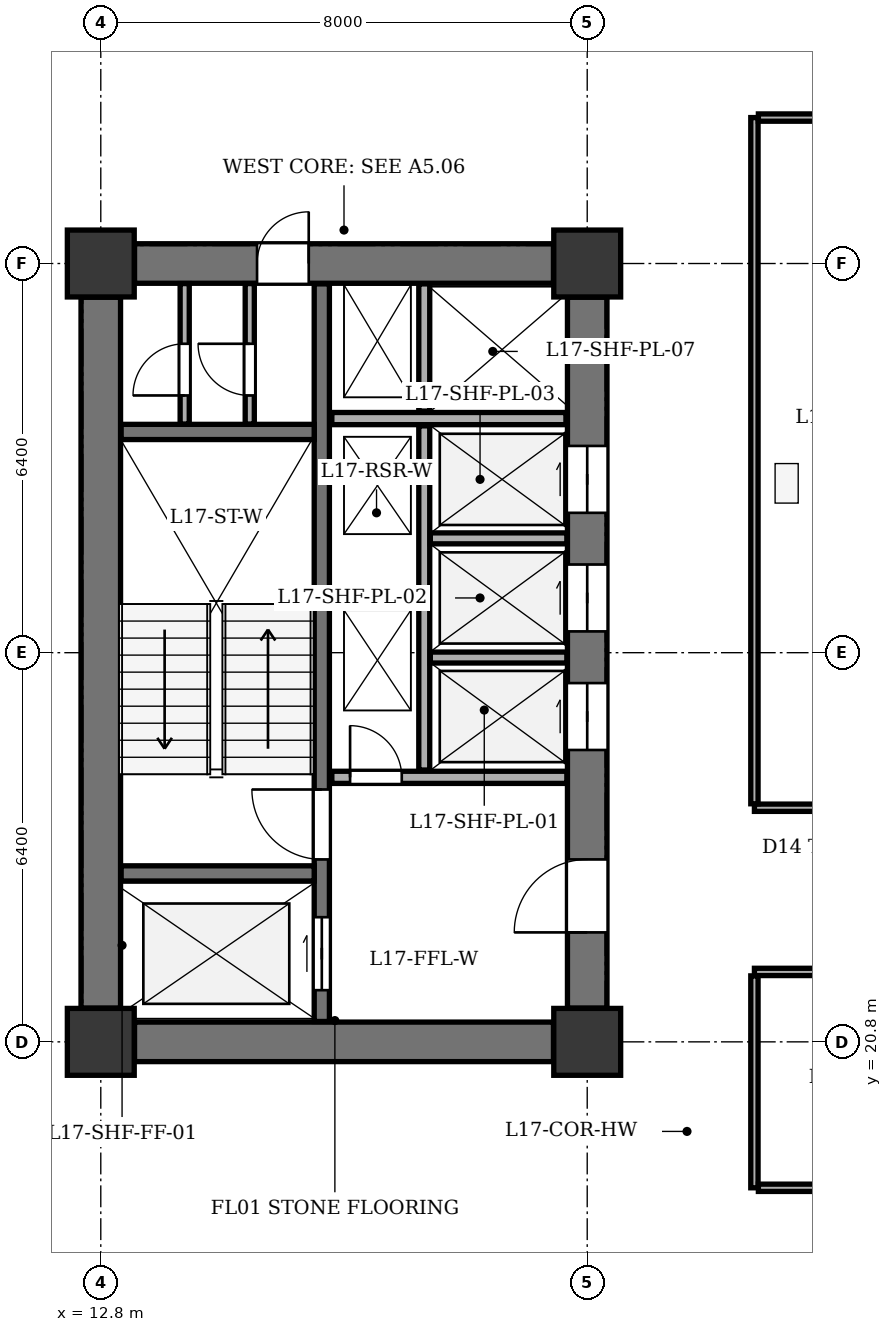
"""IFC4 building model, lengths in metres.
Left out: names, types, materials, properties, quantities, classifications, styles, units other than length and angle.
Written with IfcOpenShell. Run it as: python <this file> out.ifc"""

import sys

from ifc_helpers import new_model, si_unit, direction, frame, frame_2d, origin, origin_2d, place, context, subcontext, project, spatial, rectangle, extrude, element, fill, save


model = new_model("IFC4")
c1 = context("Model", 3, precision=1e-05, world=origin(), true_north=direction((0.0, 1.0)))
c2 = subcontext(c1, "Body", "Model", "MODEL_VIEW")
j1 = project(units=[si_unit("LENGTHUNIT", "METRE"), si_unit("PLANEANGLEUNIT", "RADIAN")], contexts=[c1])
p1 = place(None, origin())
s1 = spatial("IfcSite", under=j1, at=p1, CompositionType="ELEMENT")
p2 = place(p1, origin())
s2 = spatial("IfcBuilding", under=s1, at=p2, CompositionType="ELEMENT")
p3 = place(p2, frame((0.0, 0.0, 71.1)))
s3 = spatial("IfcBuildingStorey", under=s2, at=p3, CompositionType="ELEMENT", Elevation=71.1)
for number, where, z_axis, x_axis in (
    (1, (12.8, 20.8, 0.0), (0.0, 0.0, 1.0), (1.0, 0.0, 0.0)),
    (2, (20.8, 20.8, 0.0), (0.0, 0.0, 1.0), (1.0, 0.0, 0.0)),
    (3, (12.8, 33.6, 0.0), (0.0, 0.0, 1.0), (1.0, 0.0, 0.0)),
    (4, (20.8, 33.6, 0.0), (0.0, 0.0, 1.0), (1.0, 0.0, 0.0)),
):
    element("IfcColumn", number, at=place(p3, frame(where, z_axis=z_axis, x_axis=x_axis)), inside=s3, PredefinedType="COLUMN", context=c2, shape_type="SweptSolid", body=[
        extrude(rectangle(XDim=1.1, YDim=1.1, at=origin_2d()), origin(), (0.0, 0.0, 1.0), 3.9),
    ])
p4 = place(p3, frame((12.8, 21.355, 0.0), z_axis=(0.0, 0.0, 1.0), x_axis=(0.0, 1.0, 0.0)))
e5 = element("IfcWall", 5, at=p4, inside=s3, PredefinedType="SHEAR", context=c2, shape_type="SweptSolid", body=[
    extrude(rectangle(XDim=11.69, YDim=0.65, at=frame_2d((5.845, 0.0))), origin(), (0.0, 0.0, 1.0), 3.6),
])
p5 = place(p3, frame((13.355, 20.8, 0.0), z_axis=(0.0, 0.0, 1.0), x_axis=(1.0, 0.0, 0.0)))
e6 = element("IfcWall", 6, at=p5, inside=s3, PredefinedType="SHEAR", context=c2, shape_type="SweptSolid", body=[
    extrude(rectangle(XDim=6.89, YDim=0.65, at=frame_2d((3.445, 0.0))), origin(), (0.0, 0.0, 1.0), 3.6),
])
p6 = place(p3, frame((13.355, 33.6, 0.0), z_axis=(0.0, 0.0, 1.0), x_axis=(1.0, 0.0, 0.0)))
e7 = element("IfcWall", 7, at=p6, inside=s3, PredefinedType="SHEAR", context=c2, shape_type="SweptSolid", body=[
    extrude(rectangle(XDim=6.89, YDim=0.65, at=frame_2d((3.445, 0.0))), origin(), (0.0, 0.0, 1.0), 3.6),
])
p7 = place(p6, frame((2.015, 0.0, 0.0)))
e8 = element("IfcOpeningElement", 8, at=p7, cuts=e7, PredefinedType="OPENING", context=c2, shape_type="SweptSolid", body=[
    extrude(rectangle(XDim=0.85, YDim=2.02, at=frame_2d((0.425, 1.01))), frame((0.0, 0.335, 0.0), z_axis=(0.0, -1.0, 0.0), x_axis=(1.0, 0.0, 0.0)), (0.0, 0.0, 1.0), 0.67),
])
p8 = place(p3, frame((20.8, 21.355, 0.0), z_axis=(0.0, 0.0, 1.0), x_axis=(0.0, 1.0, 0.0)))
e9 = element("IfcWall", 9, at=p8, inside=s3, PredefinedType="SHEAR", context=c2, shape_type="SweptSolid", body=[
    extrude(rectangle(XDim=11.69, YDim=0.65, at=frame_2d((5.845, 0.0))), origin(), (0.0, 0.0, 1.0), 3.6),
])
p9 = place(p8, frame((1.245, 0.0, 0.0)))
e10 = element("IfcOpeningElement", 10, at=p9, cuts=e9, PredefinedType="OPENING", context=c2, shape_type="SweptSolid", body=[
    extrude(rectangle(XDim=1.2, YDim=2.15, at=frame_2d((0.6, 1.075))), frame((0.0, 0.335, 0.0), z_axis=(0.0, -1.0, 0.0), x_axis=(1.0, 0.0, 0.0)), (0.0, 0.0, 1.0), 0.67),
])
p10 = place(p8, frame((4.245, 0.0, 0.0)))
e11 = element("IfcOpeningElement", 11, at=p10, cuts=e9, PredefinedType="OPENING", context=c2, shape_type="SweptSolid", body=[
    extrude(rectangle(XDim=1.1, YDim=2.1, at=frame_2d((0.55, 1.05))), frame((0.0, 0.335, 0.0), z_axis=(0.0, -1.0, 0.0), x_axis=(1.0, 0.0, 0.0)), (0.0, 0.0, 1.0), 0.67),
])
p11 = place(p8, frame((6.195, 0.0, 0.0)))
e12 = element("IfcOpeningElement", 12, at=p11, cuts=e9, PredefinedType="OPENING", context=c2, shape_type="SweptSolid", body=[
    extrude(rectangle(XDim=1.1, YDim=2.1, at=frame_2d((0.55, 1.05))), frame((0.0, 0.335, 0.0), z_axis=(0.0, -1.0, 0.0), x_axis=(1.0, 0.0, 0.0)), (0.0, 0.0, 1.0), 0.67),
])
p12 = place(p8, frame((8.145, 0.0, 0.0)))
e13 = element("IfcOpeningElement", 13, at=p12, cuts=e9, PredefinedType="OPENING", context=c2, shape_type="SweptSolid", body=[
    extrude(rectangle(XDim=1.1, YDim=2.1, at=frame_2d((0.55, 1.05))), frame((0.0, 0.335, 0.0), z_axis=(0.0, -1.0, 0.0), x_axis=(1.0, 0.0, 0.0)), (0.0, 0.0, 1.0), 0.67),
])
p13 = place(p3, frame((16.435, 21.135, 0.0), z_axis=(0.0, 0.0, 1.0), x_axis=(0.0, 1.0, 0.0)))
e14 = element("IfcWall", 14, at=p13, inside=s3, PredefinedType="SHEAR", context=c2, shape_type="SweptSolid", body=[
    extrude(rectangle(XDim=12.13, YDim=0.25, at=frame_2d((6.065, 0.0))), origin(), (0.0, 0.0, 1.0), 3.6),
])
p14 = place(p13, frame((0.515, 0.0, 0.0)))
e15 = element("IfcOpeningElement", 15, at=p14, cuts=e14, PredefinedType="OPENING", context=c2, shape_type="SweptSolid", body=[
    extrude(rectangle(XDim=1.2, YDim=2.15, at=frame_2d((0.6, 1.075))), frame((0.0, 0.135, 0.0), z_axis=(0.0, -1.0, 0.0), x_axis=(1.0, 0.0, 0.0)), (0.0, 0.0, 1.0), 0.27),
])
p15 = place(p13, frame((2.665, 0.0, 0.0)))
e16 = element("IfcOpeningElement", 16, at=p15, cuts=e14, PredefinedType="OPENING", context=c2, shape_type="SweptSolid", body=[
    extrude(rectangle(XDim=1.15, YDim=2.15, at=frame_2d((0.575, 1.075))), frame((0.0, 0.135, 0.0), z_axis=(0.0, -1.0, 0.0), x_axis=(1.0, 0.0, 0.0)), (0.0, 0.0, 1.0), 0.27),
])
for number, where, z_axis, x_axis in (
    (17, (13.135, 23.57, 0.0), (0.0, 0.0, 1.0), (1.0, 0.0, 0.0)),
    (18, (13.135, 30.83, 0.0), (0.0, 0.0, 1.0), (1.0, 0.0, 0.0)),
):
    element("IfcWall", number, at=place(p3, frame(where, z_axis=z_axis, x_axis=x_axis)), inside=s3, PredefinedType="SHEAR", context=c2, shape_type="SweptSolid", body=[
        extrude(rectangle(XDim=3.175, YDim=0.25, at=frame_2d((1.587, 0.0))), origin(), (0.0, 0.0, 1.0), 3.6),
    ])
p16 = place(p3, frame((16.6, 25.15, 0.0), z_axis=(0.0, 0.0, 1.0), x_axis=(1.0, 0.0, 0.0)))
e19 = element("IfcWall", 19, at=p16, inside=s3, PredefinedType="SOLIDWALL", context=c2, shape_type="SweptSolid", body=[
    extrude(rectangle(XDim=3.865, YDim=0.2, at=frame_2d((1.933, 0.0))), origin(), (0.0, 0.0, 1.0), 3.6),
])
p17 = place(p16, frame((0.3, 0.0, 0.0)))
e20 = element("IfcOpeningElement", 20, at=p17, cuts=e19, PredefinedType="OPENING", context=c2, shape_type="SweptSolid", body=[
    extrude(rectangle(XDim=0.85, YDim=2.02, at=frame_2d((0.425, 1.01))), frame((0.0, 0.11, 0.0), z_axis=(0.0, -1.0, 0.0), x_axis=(1.0, 0.0, 0.0)), (0.0, 0.0, 1.0), 0.22),
])
p18 = place(p3, frame((16.6, 31.05, 0.0), z_axis=(0.0, 0.0, 1.0), x_axis=(1.0, 0.0, 0.0)))
e21 = element("IfcWall", 21, at=p18, inside=s3, PredefinedType="SOLIDWALL", context=c2, shape_type="SweptSolid", body=[
    extrude(rectangle(XDim=3.85, YDim=0.2, at=frame_2d((1.925, 0.0))), origin(), (0.0, 0.0, 1.0), 3.6),
])
p19 = place(p3, frame((18.12, 25.27, 0.0), z_axis=(0.0, 0.0, 1.0), x_axis=(0.0, 1.0, 0.0)))
e22 = element("IfcWall", 22, at=p19, inside=s3, PredefinedType="PARTITIONING", context=c2, shape_type="SweptSolid", body=[
    extrude(rectangle(XDim=5.66, YDim=0.18, at=frame_2d((2.83, 0.0))), origin(), (0.0, 0.0, 1.0), 3.6),
])
p20 = place(p3, frame((18.12, 31.17, 0.0), z_axis=(0.0, 0.0, 1.0), x_axis=(0.0, 1.0, 0.0)))
e23 = element("IfcWall", 23, at=p20, inside=s3, PredefinedType="PARTITIONING", context=c2, shape_type="SweptSolid", body=[
    extrude(rectangle(XDim=2.095, YDim=0.18, at=frame_2d((1.047, 0.0))), origin(), (0.0, 0.0, 1.0), 3.6),
])
for number, where, z_axis, x_axis in (
    (24, (18.22, 27.12, 0.0), (0.0, 0.0, 1.0), (1.0, 0.0, 0.0)),
    (25, (18.22, 29.08, 0.0), (0.0, 0.0, 1.0), (1.0, 0.0, 0.0)),
):
    element("IfcWall", number, at=place(p3, frame(where, z_axis=z_axis, x_axis=x_axis)), inside=s3, PredefinedType="PARTITIONING", context=c2, shape_type="SweptSolid", body=[
        extrude(rectangle(XDim=2.245, YDim=0.18, at=frame_2d((1.123, 0.0))), origin(), (0.0, 0.0, 1.0), 3.6),
    ])
p21 = place(p3, frame((14.18, 30.96, 0.0), z_axis=(0.0, 0.0, 1.0), x_axis=(0.0, 1.0, 0.0)))
e26 = element("IfcWall", 26, at=p21, inside=s3, PredefinedType="PARTITIONING", context=c2, shape_type="SweptSolid", body=[
    extrude(rectangle(XDim=2.31, YDim=0.15, at=frame_2d((1.155, 0.0))), origin(), (0.0, 0.0, 1.0), 3.6),
])
p22 = place(p21, frame((0.47, 0.0, 0.0)))
e27 = element("IfcOpeningElement", 27, at=p22, cuts=e26, PredefinedType="OPENING", context=c2, shape_type="SweptSolid", body=[
    extrude(rectangle(XDim=0.85, YDim=2.02, at=frame_2d((0.425, 1.01))), frame((0.0, 0.085, 0.0), z_axis=(0.0, -1.0, 0.0), x_axis=(1.0, 0.0, 0.0)), (0.0, 0.0, 1.0), 0.17),
])
p23 = place(p3, frame((15.25, 30.96, 0.0), z_axis=(0.0, 0.0, 1.0), x_axis=(0.0, 1.0, 0.0)))
e28 = element("IfcWall", 28, at=p23, inside=s3, PredefinedType="PARTITIONING", context=c2, shape_type="SweptSolid", body=[
    extrude(rectangle(XDim=2.31, YDim=0.15, at=frame_2d((1.155, 0.0))), origin(), (0.0, 0.0, 1.0), 3.6),
])
p24 = place(p23, frame((0.47, 0.0, 0.0)))
e29 = element("IfcOpeningElement", 29, at=p24, cuts=e28, PredefinedType="OPENING", context=c2, shape_type="SweptSolid", body=[
    extrude(rectangle(XDim=0.85, YDim=2.02, at=frame_2d((0.425, 1.01))), frame((0.0, 0.085, 0.0), z_axis=(0.0, -1.0, 0.0), x_axis=(1.0, 0.0, 0.0)), (0.0, 0.0, 1.0), 0.17),
])
p25 = place(p3, frame((23.55, 24.65, 0.0), z_axis=(0.0, 0.0, 1.0), x_axis=(1.0, 0.0, 0.0)))
e30 = element("IfcWall", 30, at=p25, inside=s3, PredefinedType="PARTITIONING", context=c2, shape_type="SweptSolid", body=[
    extrude(rectangle(XDim=8.9, YDim=0.12, at=frame_2d((4.45, 0.0))), origin(), (0.0, 0.0, 1.0), 3.135),
])
p26 = place(p25, frame((1.0, 0.0, 0.0)))
e31 = element("IfcOpeningElement", 31, at=p26, cuts=e30, PredefinedType="OPENING", context=c2, shape_type="SweptSolid", body=[
    extrude(rectangle(XDim=0.95, YDim=2.1, at=frame_2d((0.475, 1.05))), frame((0.0, 0.07, 0.0), z_axis=(0.0, -1.0, 0.0), x_axis=(1.0, 0.0, 0.0)), (0.0, 0.0, 1.0), 0.14),
])
p27 = place(p25, frame((4.1, 0.0, 0.0)))
e32 = element("IfcOpeningElement", 32, at=p27, cuts=e30, PredefinedType="OPENING", context=c2, shape_type="SweptSolid", body=[
    extrude(rectangle(XDim=0.95, YDim=2.1, at=frame_2d((0.475, 1.05))), frame((0.0, 0.07, 0.0), z_axis=(0.0, -1.0, 0.0), x_axis=(1.0, 0.0, 0.0)), (0.0, 0.0, 1.0), 0.14),
])
p28 = place(p25, frame((7.0, 0.0, 0.0)))
e33 = element("IfcOpeningElement", 33, at=p28, cuts=e30, PredefinedType="OPENING", context=c2, shape_type="SweptSolid", body=[
    extrude(rectangle(XDim=1.0, YDim=2.1, at=frame_2d((0.5, 1.05))), frame((0.0, 0.07, 0.0), z_axis=(0.0, -1.0, 0.0), x_axis=(1.0, 0.0, 0.0)), (0.0, 0.0, 1.0), 0.14),
])
p29 = place(p3, frame((23.55, 24.715, 0.0), z_axis=(0.0, 0.0, 1.0), x_axis=(0.0, 1.0, 0.0)))
e34 = element("IfcWall", 34, at=p29, inside=s3, PredefinedType="PARTITIONING", context=c2, shape_type="SweptSolid", body=[
    extrude(rectangle(XDim=11.285, YDim=0.12, at=frame_2d((5.643, 0.0))), origin(), (0.0, 0.0, 1.0), 3.6),
])
p30 = place(p3, frame((23.615, 36.0, 0.0), z_axis=(0.0, 0.0, 1.0), x_axis=(1.0, 0.0, 0.0)))
e35 = element("IfcWall", 35, at=p30, inside=s3, PredefinedType="PARTITIONING", context=c2, shape_type="SweptSolid", body=[
    extrude(rectangle(XDim=8.77, YDim=0.12, at=frame_2d((4.385, 0.0))), origin(), (0.0, 0.0, 1.0), 3.6),
])
p31 = place(p3, frame((23.55, 21.95, 0.0), z_axis=(0.0, 0.0, 1.0), x_axis=(1.0, 0.0, 0.0)))
e36 = element("IfcWall", 36, at=p31, inside=s3, PredefinedType="PARTITIONING", context=c2, shape_type="SweptSolid", body=[
    extrude(rectangle(XDim=8.9, YDim=0.12, at=frame_2d((4.45, 0.0))), origin(), (0.0, 0.0, 1.0), 3.135),
])
p32 = place(p31, frame((3.6, 0.0, 0.0)))
e37 = element("IfcOpeningElement", 37, at=p32, cuts=e36, PredefinedType="OPENING", context=c2, shape_type="SweptSolid", body=[
    extrude(rectangle(XDim=1.1, YDim=2.15, at=frame_2d((0.55, 1.075))), frame((0.0, 0.07, 0.0), z_axis=(0.0, -1.0, 0.0), x_axis=(1.0, 0.0, 0.0)), (0.0, 0.0, 1.0), 0.14),
])
p33 = place(p3, frame((23.55, 18.4, 0.0), z_axis=(0.0, 0.0, 1.0), x_axis=(0.0, 1.0, 0.0)))
e38 = element("IfcWall", 38, at=p33, inside=s3, PredefinedType="PARTITIONING", context=c2, shape_type="SweptSolid", body=[
    extrude(rectangle(XDim=3.485, YDim=0.12, at=frame_2d((1.743, 0.0))), origin(), (0.0, 0.0, 1.0), 3.6),
])
p34 = place(p3, frame((23.615, 18.4, 0.0), z_axis=(0.0, 0.0, 1.0), x_axis=(1.0, 0.0, 0.0)))
e39 = element("IfcWall", 39, at=p34, inside=s3, PredefinedType="PARTITIONING", context=c2, shape_type="SweptSolid", body=[
    extrude(rectangle(XDim=8.77, YDim=0.12, at=frame_2d((4.385, 0.0))), origin(), (0.0, 0.0, 1.0), 3.6),
])
p35 = place(p7, origin())
e40 = element("IfcDoor", 40, at=p35, inside=s3, OperationType="SINGLE_SWING_RIGHT", PredefinedType="DOOR", context=c2, shape_type="SweptSolid", body=[
    extrude(rectangle(XDim=0.85, YDim=2.02, at=frame_2d((0.425, 1.01))), frame((0.0, 0.025, 0.0), z_axis=(0.0, -1.0, 0.0), x_axis=(1.0, 0.0, 0.0)), (0.0, 0.0, 1.0), 0.05),
])
fill(e8, e40)
p36 = place(p9, origin())
e41 = element("IfcDoor", 41, at=p36, inside=s3, OperationType="SINGLE_SWING_LEFT", PredefinedType="DOOR", context=c2, shape_type="SweptSolid", body=[
    extrude(rectangle(XDim=1.2, YDim=2.15, at=frame_2d((0.6, 1.075))), frame((0.0, 0.025, 0.0), z_axis=(0.0, -1.0, 0.0), x_axis=(1.0, 0.0, 0.0)), (0.0, 0.0, 1.0), 0.05),
])
fill(e10, e41)
p37 = place(p10, origin())
e42 = element("IfcDoor", 42, at=p37, inside=s3, OperationType="DOUBLE_DOOR_SLIDING", PredefinedType="DOOR", context=c2, shape_type="SweptSolid", body=[
    extrude(rectangle(XDim=1.1, YDim=2.1, at=frame_2d((0.55, 1.05))), frame((0.0, 0.025, 0.0), z_axis=(0.0, -1.0, 0.0), x_axis=(1.0, 0.0, 0.0)), (0.0, 0.0, 1.0), 0.05),
])
fill(e11, e42)
p38 = place(p11, origin())
e43 = element("IfcDoor", 43, at=p38, inside=s3, OperationType="DOUBLE_DOOR_SLIDING", PredefinedType="DOOR", context=c2, shape_type="SweptSolid", body=[
    extrude(rectangle(XDim=1.1, YDim=2.1, at=frame_2d((0.55, 1.05))), frame((0.0, 0.025, 0.0), z_axis=(0.0, -1.0, 0.0), x_axis=(1.0, 0.0, 0.0)), (0.0, 0.0, 1.0), 0.05),
])
fill(e12, e43)
p39 = place(p12, origin())
e44 = element("IfcDoor", 44, at=p39, inside=s3, OperationType="DOUBLE_DOOR_SLIDING", PredefinedType="DOOR", context=c2, shape_type="SweptSolid", body=[
    extrude(rectangle(XDim=1.1, YDim=2.1, at=frame_2d((0.55, 1.05))), frame((0.0, 0.025, 0.0), z_axis=(0.0, -1.0, 0.0), x_axis=(1.0, 0.0, 0.0)), (0.0, 0.0, 1.0), 0.05),
])
fill(e13, e44)
p40 = place(p14, origin())
e45 = element("IfcDoor", 45, at=p40, inside=s3, OperationType="DOUBLE_DOOR_SLIDING", PredefinedType="DOOR", context=c2, shape_type="SweptSolid", body=[
    extrude(rectangle(XDim=1.2, YDim=2.15, at=frame_2d((0.6, 1.075))), frame((0.0, 0.025, 0.0), z_axis=(0.0, -1.0, 0.0), x_axis=(1.0, 0.0, 0.0)), (0.0, 0.0, 1.0), 0.05),
])
fill(e15, e45)
p41 = place(p15, origin())
e46 = element("IfcDoor", 46, at=p41, inside=s3, OperationType="SINGLE_SWING_RIGHT", PredefinedType="DOOR", context=c2, shape_type="SweptSolid", body=[
    extrude(rectangle(XDim=1.15, YDim=2.15, at=frame_2d((0.575, 1.075))), frame((0.0, 0.025, 0.0), z_axis=(0.0, -1.0, 0.0), x_axis=(1.0, 0.0, 0.0)), (0.0, 0.0, 1.0), 0.05),
])
fill(e16, e46)
p42 = place(p17, origin())
e47 = element("IfcDoor", 47, at=p42, inside=s3, OperationType="SINGLE_SWING_LEFT", PredefinedType="DOOR", context=c2, shape_type="SweptSolid", body=[
    extrude(rectangle(XDim=0.85, YDim=2.02, at=frame_2d((0.425, 1.01))), frame((0.0, 0.025, 0.0), z_axis=(0.0, -1.0, 0.0), x_axis=(1.0, 0.0, 0.0)), (0.0, 0.0, 1.0), 0.05),
])
fill(e20, e47)
p43 = place(p22, origin())
e48 = element("IfcDoor", 48, at=p43, inside=s3, OperationType="SINGLE_SWING_LEFT", PredefinedType="DOOR", context=c2, shape_type="SweptSolid", body=[
    extrude(rectangle(XDim=0.85, YDim=2.02, at=frame_2d((0.425, 1.01))), frame((0.0, 0.025, 0.0), z_axis=(0.0, -1.0, 0.0), x_axis=(1.0, 0.0, 0.0)), (0.0, 0.0, 1.0), 0.05),
])
fill(e27, e48)
p44 = place(p24, origin())
e49 = element("IfcDoor", 49, at=p44, inside=s3, OperationType="SINGLE_SWING_RIGHT", PredefinedType="DOOR", context=c2, shape_type="SweptSolid", body=[
    extrude(rectangle(XDim=0.85, YDim=2.02, at=frame_2d((0.425, 1.01))), frame((0.0, 0.025, 0.0), z_axis=(0.0, -1.0, 0.0), x_axis=(1.0, 0.0, 0.0)), (0.0, 0.0, 1.0), 0.05),
])
fill(e29, e49)
save(model, sys.argv[1])
